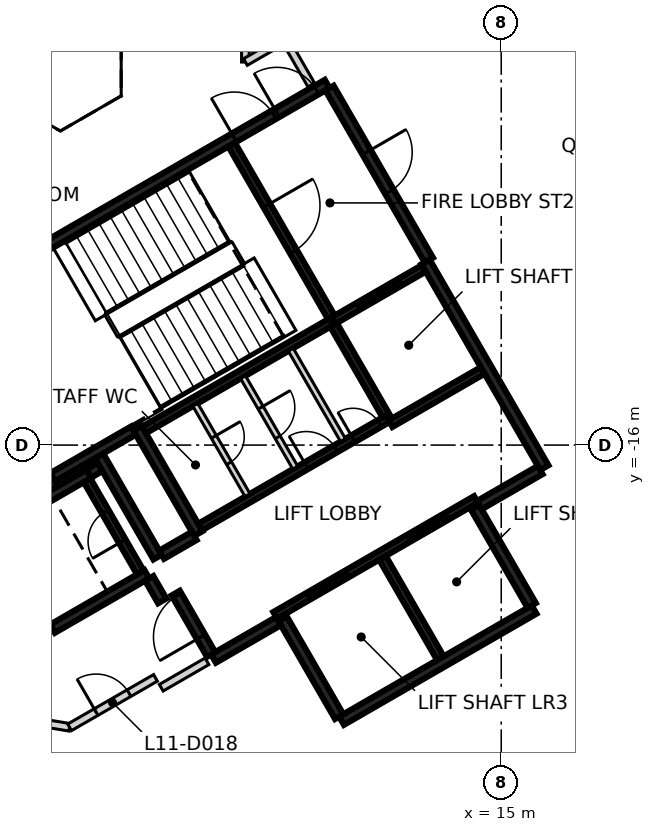
"""IFC4 building model, lengths in metres.
Left out: names, types, materials, properties, quantities, classifications, styles, units other than length and angle.
Written with IfcOpenShell. Run it as: python <this file> out.ifc"""

import sys

from ifc_helpers import new_model, si_unit, direction, frame, frame_2d, origin, place, context, subcontext, project, spatial, rectangle, extrude, element, fill, save


model = new_model("IFC4")
c1 = context("Model", 3, precision=1e-05, world=origin(), true_north=direction((0.0, 1.0)))
c2 = subcontext(c1, "Body", "Model", "MODEL_VIEW")
j1 = project(units=[si_unit("LENGTHUNIT", "METRE"), si_unit("PLANEANGLEUNIT", "RADIAN")], contexts=[c1])
p1 = place(None, origin())
s1 = spatial("IfcSite", under=j1, at=p1, CompositionType="ELEMENT")
p2 = place(p1, origin())
s2 = spatial("IfcBuilding", under=s1, at=p2, CompositionType="ELEMENT")
p3 = place(p2, frame((0.0, 0.0, 53.0)))
s3 = spatial("IfcBuildingStorey", under=s2, at=p3, CompositionType="ELEMENT", Elevation=53.0)
p4 = place(p3, frame((0.417, -12.273, 0.0), z_axis=(0.0, 0.0, 1.0), x_axis=(0.866021906294, 0.500006057782, 0.0)))
e1 = element("IfcWall", 1, at=p4, inside=s3, PredefinedType="SHEAR", context=c2, shape_type="SweptSolid", body=[
    extrude(rectangle(XDim=11.55, YDim=0.25, at=frame_2d((5.775, 0.0))), origin(), (0.0, 0.0, 1.0), 3.125),
])
p5 = place(p4, frame((10.025, 0.0, 0.0)))
e2 = element("IfcOpeningElement", 2, at=p5, cuts=e1, PredefinedType="OPENING", context=c2, shape_type="SweptSolid", body=[
    extrude(rectangle(XDim=1.2, YDim=2.1, at=frame_2d((0.6, 1.05))), frame((0.0, 0.135, 0.0), z_axis=(0.0, -1.0, 0.0), x_axis=(1.0, 0.0, 0.0)), (0.0, 0.0, 1.0), 0.27),
])
p6 = place(p4, frame((8.725, 0.0, 0.0)))
e3 = element("IfcOpeningElement", 3, at=p6, cuts=e1, PredefinedType="OPENING", context=c2, shape_type="SweptSolid", body=[
    extrude(rectangle(XDim=1.2, YDim=2.1, at=frame_2d((0.6, 1.05))), frame((0.0, 0.135, 0.0), z_axis=(0.0, -1.0, 0.0), x_axis=(1.0, 0.0, 0.0)), (0.0, 0.0, 1.0), 0.27),
])
p7 = place(p3, frame((13.008, -11.181, 0.0), z_axis=(0.0, 0.0, 1.0), x_axis=(0.500004234368, -0.866022959057, 0.0)))
e4 = element("IfcWall", 4, at=p7, inside=s3, PredefinedType="SHEAR", context=c2, shape_type="SweptSolid", body=[
    extrude(rectangle(XDim=6.25, YDim=0.25, at=frame_2d((3.125, 0.0))), origin(), (0.0, 0.0, 1.0), 3.125),
])
p8 = place(p3, frame((15.865, -20.328, 0.0), z_axis=(0.0, 0.0, 1.0), x_axis=(-0.86602852612, -0.499994591916, 0.0)))
e5 = element("IfcWall", 5, at=p8, inside=s3, PredefinedType="SHEAR", context=c2, shape_type="SweptSolid", body=[
    extrude(rectangle(XDim=5.85, YDim=0.25, at=frame_2d((2.925, 0.0))), origin(), (0.0, 0.0, 1.0), 3.125),
])
p9 = place(p3, frame((3.235, -17.153, 0.0), z_axis=(0.0, 0.0, 1.0), x_axis=(-0.500008851346, 0.866020293397, 0.0)))
e6 = element("IfcWall", 6, at=p9, inside=s3, PredefinedType="SHEAR", context=c2, shape_type="SweptSolid", body=[
    extrude(rectangle(XDim=5.51, YDim=0.25, at=frame_2d((2.755, 0.0))), origin(), (0.0, 0.0, 1.0), 3.125),
])
p10 = place(p3, frame((10.483, -6.606, 0.0), z_axis=(0.0, 0.0, 1.0), x_axis=(0.49999885962, -0.866026062182, 0.0)))
e7 = element("IfcWall", 7, at=p10, inside=s3, PredefinedType="SHEAR", context=c2, shape_type="SweptSolid", body=[
    extrude(rectangle(XDim=5.225, YDim=0.25, at=frame_2d((2.612, 0.0))), origin(), (0.0, 0.0, 1.0), 3.125),
])
p11 = place(p10, frame((1.95, 0.0, 0.0)))
e8 = element("IfcOpeningElement", 8, at=p11, cuts=e7, PredefinedType="OPENING", context=c2, shape_type="SweptSolid", body=[
    extrude(rectangle(XDim=1.2, YDim=2.1, at=frame_2d((0.6, 1.05))), frame((0.0, 0.135, 0.0), z_axis=(0.0, -1.0, 0.0), x_axis=(1.0, 0.0, 0.0)), (0.0, 0.0, 1.0), 0.27),
])
p12 = place(p3, frame((7.031, -18.327, 0.0), z_axis=(0.0, 0.0, 1.0), x_axis=(-0.499971222258, 0.866042017984, 0.0)))
e9 = element("IfcWall", 9, at=p12, inside=s3, PredefinedType="SHEAR", context=c2, shape_type="SweptSolid", body=[
    extrude(rectangle(XDim=3.2, YDim=0.25, at=frame_2d((1.6, 0.0))), origin(), (0.0, 0.0, 1.0), 3.125),
])
for number, where, z_axis, x_axis in (
    (10, (14.315, -17.644, 0.0), (0.0, 0.0, 1.0), (0.5, -0.866, 0.0)),
    (11, (10.736, -23.145, 0.0), (0.0, 0.0, 1.0), (-0.5, 0.866, 0.0)),
):
    element("IfcWall", number, at=place(p3, frame(where, z_axis=z_axis, x_axis=x_axis)), inside=s3, PredefinedType="SHEAR", context=c2, shape_type="SweptSolid", body=[
        extrude(rectangle(XDim=2.974, YDim=0.25, at=frame_2d((1.487, 0.0))), origin(), (0.0, 0.0, 1.0), 3.125),
    ])
p13 = place(p3, frame((3.085, -20.894, 0.0), z_axis=(0.0, 0.0, 1.0), x_axis=(-0.499978833458, 0.866037623948, 0.0)))
e12 = element("IfcWall", 12, at=p13, inside=s3, PredefinedType="SHEAR", context=c2, shape_type="SweptSolid", body=[
    extrude(rectangle(XDim=3.05, YDim=0.25, at=frame_2d((1.525, 0.0))), origin(), (0.0, 0.0, 1.0), 3.125),
])
p14 = place(p3, frame((1.669, -18.19, 0.0), z_axis=(0.0, 0.0, 1.0), x_axis=(0.866042235819, 0.499970844928, 0.0)))
e13 = element("IfcWall", 13, at=p14, inside=s3, PredefinedType="SHEAR", context=c2, shape_type="SweptSolid", body=[
    extrude(rectangle(XDim=2.865, YDim=0.25, at=frame_2d((1.432, 0.0))), origin(), (0.0, 0.0, 1.0), 3.125),
])
p15 = place(p3, frame((5.675, -19.399, 0.0), z_axis=(0.0, 0.0, 1.0), x_axis=(-0.866026637627, -0.499997862916, 0.0)))
e14 = element("IfcWall", 14, at=p15, inside=s3, PredefinedType="SHEAR", context=c2, shape_type="SweptSolid", body=[
    extrude(rectangle(XDim=2.865, YDim=0.25, at=frame_2d((1.432, 0.0))), origin(), (0.0, 0.0, 1.0), 3.125),
])
p16 = place(p3, frame((4.414, -16.276, 0.0), z_axis=(0.0, 0.0, 1.0), x_axis=(0.500003324108, -0.866023484601, 0.0)))
e15 = element("IfcWall", 15, at=p16, inside=s3, PredefinedType="SHEAR", context=c2, shape_type="SweptSolid", body=[
    extrude(rectangle(XDim=3.085, YDim=0.25, at=frame_2d((1.542, 0.0))), origin(), (0.0, 0.0, 1.0), 3.125),
])
p17 = place(p3, frame((5.322, -15.619, 0.0), z_axis=(0.0, 0.0, 1.0), x_axis=(-0.866026229868, -0.499998569178, 0.0)))
e16 = element("IfcWall", 16, at=p17, inside=s3, PredefinedType="SHEAR", context=c2, shape_type="SweptSolid", body=[
    extrude(rectangle(XDim=2.449, YDim=0.25, at=frame_2d((1.225, 0.0))), origin(), (0.0, 0.0, 1.0), 3.125),
])
p18 = place(p3, frame((9.14, -20.631, 0.0), z_axis=(0.0, 0.0, 1.0), x_axis=(-0.866043531843, -0.499968599967, 0.0)))
e17 = element("IfcWall", 17, at=p18, inside=s3, PredefinedType="SHEAR", context=c2, shape_type="SweptSolid", body=[
    extrude(rectangle(XDim=1.975, YDim=0.25, at=frame_2d((0.987, 0.0))), origin(), (0.0, 0.0, 1.0), 3.125),
])
p19 = place(p3, frame((16.025, -16.656, 0.0), z_axis=(0.0, 0.0, 1.0), x_axis=(-0.866016279763, -0.500015802937, 0.0)))
e18 = element("IfcWall", 18, at=p19, inside=s3, PredefinedType="SHEAR", context=c2, shape_type="SweptSolid", body=[
    extrude(rectangle(XDim=1.849, YDim=0.25, at=frame_2d((0.925, 0.0))), origin(), (0.0, 0.0, 1.0), 3.125),
])
p20 = place(p3, frame((7.367, -21.51, 0.0), z_axis=(0.0, 0.0, 1.0), x_axis=(-0.499983108224, 0.866035156036, 0.0)))
e19 = element("IfcWall", 19, at=p20, inside=s3, PredefinedType="SHEAR", context=c2, shape_type="SweptSolid", body=[
    extrude(rectangle(XDim=1.865, YDim=0.25, at=frame_2d((0.932, 0.0))), origin(), (0.0, 0.0, 1.0), 3.125),
])
p21 = place(p20, frame((0.535, 0.0, 0.0)))
e20 = element("IfcOpeningElement", 20, at=p21, cuts=e19, PredefinedType="OPENING", context=c2, shape_type="SweptSolid", body=[
    extrude(rectangle(XDim=1.25, YDim=2.1, at=frame_2d((0.625, 1.05))), frame((0.0, 0.135, 0.0), z_axis=(0.0, -1.0, 0.0), x_axis=(1.0, 0.0, 0.0)), (0.0, 0.0, 1.0), 0.27),
])
p22 = place(p3, frame((6.065, -18.885, 0.0), z_axis=(0.0, 0.0, 1.0), x_axis=(0.866017078145, 0.500014420154, 0.0)))
e21 = element("IfcWall", 21, at=p22, inside=s3, PredefinedType="SHEAR", context=c2, shape_type="SweptSolid", body=[
    extrude(rectangle(XDim=0.989, YDim=0.25, at=frame_2d((0.495, 0.0))), origin(), (0.0, 0.0, 1.0), 3.125),
])
p23 = place(p3, frame((6.08, -20.1, 0.0), z_axis=(0.0, 0.0, 1.0), x_axis=(-0.500051773299, 0.865995510393, 0.0)))
e22 = element("IfcWall", 22, at=p23, inside=s3, PredefinedType="SHEAR", context=c2, shape_type="SweptSolid", body=[
    extrude(rectangle(XDim=0.685, YDim=0.25, at=frame_2d((0.342, 0.0))), origin(), (0.0, 0.0, 1.0), 3.125),
])
p24 = place(p3, frame((4.145, -16.749, 0.0), z_axis=(0.0, 0.0, 1.0), x_axis=(0.866185586049, 0.49972245349, 0.0)))
e23 = element("IfcWall", 23, at=p24, inside=s3, PredefinedType="SHEAR", context=c2, shape_type="SweptSolid", body=[
    extrude(rectangle(XDim=0.344, YDim=0.25, at=frame_2d((0.172, 0.0))), origin(), (0.0, 0.0, 1.0), 3.125),
])
p25 = place(p3, frame((9.052, -20.48, 0.0), z_axis=(0.0, 0.0, 1.0), x_axis=(0.866030299012, 0.499991521122, 0.0)))
e24 = element("IfcWall", 24, at=p25, inside=s3, PredefinedType="SHEAR", context=c2, shape_type="SweptSolid", body=[
    extrude(rectangle(XDim=6.1, YDim=0.2, at=frame_2d((3.05, 0.0))), origin(), (0.0, 0.0, 1.0), 3.125),
])
p26 = place(p25, frame((1.0, 0.0, 0.0)))
e25 = element("IfcOpeningElement", 25, at=p26, cuts=e24, PredefinedType="OPENING", context=c2, shape_type="SweptSolid", body=[
    extrude(rectangle(XDim=1.2, YDim=2.1, at=frame_2d((0.6, 1.05))), frame((0.0, 0.11, 0.0), z_axis=(0.0, -1.0, 0.0), x_axis=(1.0, 0.0, 0.0)), (0.0, 0.0, 1.0), 0.22),
])
p27 = place(p25, frame((4.05, 0.0, 0.0)))
e26 = element("IfcOpeningElement", 26, at=p27, cuts=e24, PredefinedType="OPENING", context=c2, shape_type="SweptSolid", body=[
    extrude(rectangle(XDim=1.2, YDim=2.1, at=frame_2d((0.6, 1.05))), frame((0.0, 0.11, 0.0), z_axis=(0.0, -1.0, 0.0), x_axis=(1.0, 0.0, 0.0)), (0.0, 0.0, 1.0), 0.22),
])
p28 = place(p3, frame((10.538, -12.752, 0.0), z_axis=(0.0, 0.0, 1.0), x_axis=(-0.866038630372, -0.499977090179, 0.0)))
e27 = element("IfcWall", 27, at=p28, inside=s3, PredefinedType="SHEAR", context=c2, shape_type="SweptSolid", body=[
    extrude(rectangle(XDim=5.699, YDim=0.2, at=frame_2d((2.85, 0.0))), origin(), (0.0, 0.0, 1.0), 3.125),
])
p29 = place(p3, frame((7.077, -18.156, 0.0), z_axis=(0.0, 0.0, 1.0), x_axis=(0.866038630372, 0.499977090179, 0.0)))
e28 = element("IfcWall", 28, at=p29, inside=s3, PredefinedType="SHEAR", context=c2, shape_type="SweptSolid", body=[
    extrude(rectangle(XDim=5.699, YDim=0.2, at=frame_2d((2.85, 0.0))), origin(), (0.0, 0.0, 1.0), 3.125),
])
p30 = place(p29, frame((3.224, 0.0, 0.0)))
e29 = element("IfcOpeningElement", 29, at=p30, cuts=e28, PredefinedType="OPENING", context=c2, shape_type="SweptSolid", body=[
    extrude(rectangle(XDim=0.9, YDim=2.1, at=frame_2d((0.45, 1.05))), frame((0.0, 0.11, 0.0), z_axis=(0.0, -1.0, 0.0), x_axis=(1.0, 0.0, 0.0)), (0.0, 0.0, 1.0), 0.22),
])
p31 = place(p29, frame((4.649, 0.0, 0.0)))
e30 = element("IfcOpeningElement", 30, at=p31, cuts=e28, PredefinedType="OPENING", context=c2, shape_type="SweptSolid", body=[
    extrude(rectangle(XDim=0.8, YDim=2.1, at=frame_2d((0.4, 1.05))), frame((0.0, 0.11, 0.0), z_axis=(0.0, -1.0, 0.0), x_axis=(1.0, 0.0, 0.0)), (0.0, 0.0, 1.0), 0.22),
])
p32 = place(p3, frame((7.906, -8.094, 0.0), z_axis=(0.0, 0.0, 1.0), x_axis=(0.500024287448, -0.866011380966, 0.0)))
e31 = element("IfcWall", 31, at=p32, inside=s3, PredefinedType="SHEAR", context=c2, shape_type="SweptSolid", body=[
    extrude(rectangle(XDim=5.251, YDim=0.2, at=frame_2d((2.625, 0.0))), origin(), (0.0, 0.0, 1.0), 3.125),
])
p33 = place(p32, frame((1.849, 0.0, 0.0)))
e32 = element("IfcOpeningElement", 32, at=p33, cuts=e31, PredefinedType="OPENING", context=c2, shape_type="SweptSolid", body=[
    extrude(rectangle(XDim=1.4, YDim=2.1, at=frame_2d((0.7, 1.05))), frame((0.0, 0.11, 0.0), z_axis=(0.0, -1.0, 0.0), x_axis=(1.0, 0.0, 0.0)), (0.0, 0.0, 1.0), 0.22),
])
p34 = place(p3, frame((11.875, -18.967, 0.0), z_axis=(0.0, 0.0, 1.0), x_axis=(0.49998131003, -0.866036194175, 0.0)))
e33 = element("IfcWall", 33, at=p34, inside=s3, PredefinedType="SHEAR", context=c2, shape_type="SweptSolid", body=[
    extrude(rectangle(XDim=3.048, YDim=0.2, at=frame_2d((1.524, 0.0))), origin(), (0.0, 0.0, 1.0), 3.125),
])
p35 = place(p3, frame((5.503, -19.352, 0.0), z_axis=(0.0, 0.0, 1.0), x_axis=(-0.499986818241, 0.866033014143, 0.0)))
e34 = element("IfcWall", 34, at=p35, inside=s3, PredefinedType="SHEAR", context=c2, shape_type="SweptSolid", body=[
    extrude(rectangle(XDim=2.798, YDim=0.2, at=frame_2d((1.399, 0.0))), origin(), (0.0, 0.0, 1.0), 3.125),
])
p36 = place(p35, frame((0.949, 0.0, 0.0)))
e35 = element("IfcOpeningElement", 35, at=p36, cuts=e34, PredefinedType="OPENING", context=c2, shape_type="SweptSolid", body=[
    extrude(rectangle(XDim=0.9, YDim=2.1, at=frame_2d((0.45, 1.05))), frame((0.0, 0.11, 0.0), z_axis=(0.0, -1.0, 0.0), x_axis=(1.0, 0.0, 0.0)), (0.0, 0.0, 1.0), 0.22),
])
p37 = place(p3, frame((11.963, -15.22, 0.0), z_axis=(0.0, 0.0, 1.0), x_axis=(-0.500034990121, 0.866005201286, 0.0)))
e36 = element("IfcWall", 36, at=p37, inside=s3, PredefinedType="SHEAR", context=c2, shape_type="SweptSolid", body=[
    extrude(rectangle(XDim=2.75, YDim=0.2, at=frame_2d((1.375, 0.0))), origin(), (0.0, 0.0, 1.0), 3.125),
])
p38 = place(p3, frame((10.587, -12.723, 0.0), z_axis=(0.0, 0.0, 1.0), x_axis=(0.866037306777, 0.499979382845, 0.0)))
e37 = element("IfcWall", 37, at=p38, inside=s3, PredefinedType="SHEAR", context=c2, shape_type="SweptSolid", body=[
    extrude(rectangle(XDim=2.742, YDim=0.2, at=frame_2d((1.371, 0.0))), origin(), (0.0, 0.0, 1.0), 3.125),
])
p39 = place(p38, frame((0.743, 0.0, 0.0)))
e38 = element("IfcOpeningElement", 38, at=p39, cuts=e37, PredefinedType="OPENING", context=c2, shape_type="SweptSolid", body=[
    extrude(rectangle(XDim=1.3, YDim=2.1, at=frame_2d((0.65, 1.05))), frame((0.0, 0.11, 0.0), z_axis=(0.0, -1.0, 0.0), x_axis=(1.0, 0.0, 0.0)), (0.0, 0.0, 1.0), 0.22),
])
p40 = place(p3, frame((14.512, -14.037, 0.0), z_axis=(0.0, 0.0, 1.0), x_axis=(-0.866044696403, -0.499966582715, 0.0)))
e39 = element("IfcWall", 39, at=p40, inside=s3, PredefinedType="SHEAR", context=c2, shape_type="SweptSolid", body=[
    extrude(rectangle(XDim=2.799, YDim=0.2, at=frame_2d((1.399, 0.0))), origin(), (0.0, 0.0, 1.0), 3.125),
])
p41 = place(p3, frame((8.207, -14.214, 0.0), z_axis=(0.0, 0.0, 1.0), x_axis=(0.50002746344, -0.86600954718, 0.0)))
e40 = element("IfcWall", 40, at=p41, inside=s3, PredefinedType="PARTITIONING", context=c2, shape_type="SweptSolid", body=[
    extrude(rectangle(XDim=2.748, YDim=0.15, at=frame_2d((1.374, 0.0))), origin(), (0.0, 0.0, 1.0), 3.125),
])
p42 = place(p41, frame((0.924, 0.0, 0.0)))
e41 = element("IfcOpeningElement", 41, at=p42, cuts=e40, PredefinedType="OPENING", context=c2, shape_type="SweptSolid", body=[
    extrude(rectangle(XDim=0.9, YDim=2.1, at=frame_2d((0.45, 1.05))), frame((0.0, 0.085, 0.0), z_axis=(0.0, -1.0, 0.0), x_axis=(1.0, 0.0, 0.0)), (0.0, 0.0, 1.0), 0.17),
])
p43 = place(p3, frame((9.462, -13.489, 0.0), z_axis=(0.0, 0.0, 1.0), x_axis=(0.499988999718, -0.866031754707, 0.0)))
e42 = element("IfcWall", 42, at=p43, inside=s3, PredefinedType="PARTITIONING", context=c2, shape_type="SweptSolid", body=[
    extrude(rectangle(XDim=2.749, YDim=0.15, at=frame_2d((1.374, 0.0))), origin(), (0.0, 0.0, 1.0), 3.125),
])
p44 = place(p3, frame((6.951, -14.939, 0.0), z_axis=(0.0, 0.0, 1.0), x_axis=(0.499988999718, -0.866031754707, 0.0)))
e43 = element("IfcWall", 43, at=p44, inside=s3, PredefinedType="PARTITIONING", context=c2, shape_type="SweptSolid", body=[
    extrude(rectangle(XDim=2.749, YDim=0.15, at=frame_2d((1.374, 0.0))), origin(), (0.0, 0.0, 1.0), 3.125),
])
p45 = place(p44, frame((0.974, 0.0, 0.0)))
e44 = element("IfcOpeningElement", 44, at=p45, cuts=e43, PredefinedType="OPENING", context=c2, shape_type="SweptSolid", body=[
    extrude(rectangle(XDim=0.8, YDim=2.1, at=frame_2d((0.4, 1.05))), frame((0.0, 0.085, 0.0), z_axis=(0.0, -1.0, 0.0), x_axis=(1.0, 0.0, 0.0)), (0.0, 0.0, 1.0), 0.17),
])
p46 = place(p3, frame((1.584, -23.086, 0.0), z_axis=(0.0, 0.0, 1.0), x_axis=(0.986633159246, -0.162957077405, 0.0)))
e45 = element("IfcWall", 45, at=p46, inside=s3, PredefinedType="PARTITIONING", context=c2, shape_type="SweptSolid", body=[
    extrude(rectangle(XDim=2.087, YDim=0.2, at=frame_2d((1.043, 0.0))), origin(), (0.0, 0.0, 1.0), 3.125),
])
p47 = place(p3, frame((3.643, -23.426, 0.0), z_axis=(0.0, 0.0, 1.0), x_axis=(0.866654350985, 0.498909045738, 0.0)))
e46 = element("IfcWall", 46, at=p47, inside=s3, PredefinedType="PARTITIONING", context=c2, shape_type="SweptSolid", body=[
    extrude(rectangle(XDim=2.608, YDim=0.2, at=frame_2d((1.304, 0.0))), origin(), (0.0, 0.0, 1.0), 3.125),
])
p48 = place(p47, frame((0.804, 0.0, 0.0)))
e47 = element("IfcOpeningElement", 47, at=p48, cuts=e46, PredefinedType="OPENING", context=c2, shape_type="SweptSolid", body=[
    extrude(rectangle(XDim=1.0, YDim=2.1, at=frame_2d((0.5, 1.05))), frame((0.0, 0.11, 0.0), z_axis=(0.0, -1.0, 0.0), x_axis=(1.0, 0.0, 0.0)), (0.0, 0.0, 1.0), 0.22),
])
p49 = place(p3, frame((6.054, -22.385, 0.0), z_axis=(0.0, 0.0, 1.0), x_axis=(0.86593101922, 0.500163443238, 0.0)))
e48 = element("IfcWall", 48, at=p49, inside=s3, PredefinedType="PARTITIONING", context=c2, shape_type="SweptSolid", body=[
    extrude(rectangle(XDim=1.39, YDim=0.2, at=frame_2d((0.695, 0.0))), origin(), (0.0, 0.0, 1.0), 3.125),
])
p50 = place(p3, frame((8.268, -5.921, 0.0), z_axis=(0.0, 0.0, 1.0), x_axis=(0.0, 1.0, 0.0)))
e49 = element("IfcWall", 49, at=p50, inside=s3, PredefinedType="PARTITIONING", context=c2, shape_type="SweptSolid", body=[
    extrude(rectangle(XDim=1.2, YDim=0.2, at=frame_2d((0.6, 0.0))), origin(), (0.0, 0.0, 1.0), 3.125),
])
p51 = place(p3, frame((8.268, -5.921, 0.0), z_axis=(0.0, 0.0, 1.0), x_axis=(0.866344856625, 0.499446282797, 0.0)))
e50 = element("IfcWall", 50, at=p51, inside=s3, PredefinedType="PARTITIONING", context=c2, shape_type="SweptSolid", body=[
    extrude(rectangle(XDim=1.199, YDim=0.2, at=frame_2d((0.6, 0.0))), origin(), (0.0, 0.0, 1.0), 3.125),
])
p52 = place(p3, frame((9.307, -5.322, 0.0), z_axis=(0.0, 0.0, 1.0), x_axis=(0.500295157811, -0.865854927266, 0.0)))
e51 = element("IfcWall", 51, at=p52, inside=s3, PredefinedType="PARTITIONING", context=c2, shape_type="SweptSolid", body=[
    extrude(rectangle(XDim=1.39, YDim=0.2, at=frame_2d((0.695, 0.0))), origin(), (0.0, 0.0, 1.0), 3.125),
])
p53 = place(p39, origin())
e52 = element("IfcDoor", 52, at=p53, inside=s3, OperationType="SLIDING_TO_RIGHT", PredefinedType="DOOR", context=c2, shape_type="SweptSolid", body=[
    extrude(rectangle(XDim=1.3, YDim=2.1, at=frame_2d((0.65, 1.05))), frame((0.0, 0.025, 0.0), z_axis=(0.0, -1.0, 0.0), x_axis=(1.0, 0.0, 0.0)), (0.0, 0.0, 1.0), 0.05),
])
fill(e38, e52)
p54 = place(p26, origin())
e53 = element("IfcDoor", 53, at=p54, inside=s3, OperationType="DOUBLE_DOOR_SLIDING", PredefinedType="DOOR", context=c2, shape_type="SweptSolid", body=[
    extrude(rectangle(XDim=1.2, YDim=2.1, at=frame_2d((0.6, 1.05))), frame((0.0, 0.025, 0.0), z_axis=(0.0, -1.0, 0.0), x_axis=(1.0, 0.0, 0.0)), (0.0, 0.0, 1.0), 0.05),
])
fill(e25, e53)
p55 = place(p27, origin())
e54 = element("IfcDoor", 54, at=p55, inside=s3, OperationType="DOUBLE_DOOR_SLIDING", PredefinedType="DOOR", context=c2, shape_type="SweptSolid", body=[
    extrude(rectangle(XDim=1.2, YDim=2.1, at=frame_2d((0.6, 1.05))), frame((0.0, 0.025, 0.0), z_axis=(0.0, -1.0, 0.0), x_axis=(1.0, 0.0, 0.0)), (0.0, 0.0, 1.0), 0.05),
])
fill(e26, e54)
p56 = place(p21, origin())
e55 = element("IfcDoor", 55, at=p56, inside=s3, OperationType="SINGLE_SWING_LEFT", PredefinedType="DOOR", context=c2, shape_type="SweptSolid", body=[
    extrude(rectangle(XDim=1.25, YDim=2.1, at=frame_2d((0.625, 1.05))), frame((0.0, 0.025, 0.0), z_axis=(0.0, -1.0, 0.0), x_axis=(1.0, 0.0, 0.0)), (0.0, 0.0, 1.0), 0.05),
])
fill(e20, e55)
p57 = place(p5, origin())
e56 = element("IfcDoor", 56, at=p57, inside=s3, OperationType="SINGLE_SWING_LEFT", PredefinedType="DOOR", context=c2, shape_type="SweptSolid", body=[
    extrude(rectangle(XDim=1.2, YDim=2.1, at=frame_2d((0.6, 1.05))), frame((0.0, 0.025, 0.0), z_axis=(0.0, -1.0, 0.0), x_axis=(1.0, 0.0, 0.0)), (0.0, 0.0, 1.0), 0.05),
])
fill(e2, e56)
p58 = place(p6, origin())
e57 = element("IfcDoor", 57, at=p58, inside=s3, OperationType="SINGLE_SWING_RIGHT", PredefinedType="DOOR", context=c2, shape_type="SweptSolid", body=[
    extrude(rectangle(XDim=1.2, YDim=2.1, at=frame_2d((0.6, 1.05))), frame((0.0, 0.025, 0.0), z_axis=(0.0, -1.0, 0.0), x_axis=(1.0, 0.0, 0.0)), (0.0, 0.0, 1.0), 0.05),
])
fill(e3, e57)
p59 = place(p33, origin())
e58 = element("IfcDoor", 58, at=p59, inside=s3, OperationType="SINGLE_SWING_RIGHT", PredefinedType="DOOR", context=c2, shape_type="SweptSolid", body=[
    extrude(rectangle(XDim=1.4, YDim=2.1, at=frame_2d((0.7, 1.05))), frame((0.0, 0.025, 0.0), z_axis=(0.0, -1.0, 0.0), x_axis=(1.0, 0.0, 0.0)), (0.0, 0.0, 1.0), 0.05),
])
fill(e32, e58)
p60 = place(p30, origin())
e59 = element("IfcDoor", 59, at=p60, inside=s3, OperationType="SINGLE_SWING_LEFT", PredefinedType="DOOR", context=c2, shape_type="SweptSolid", body=[
    extrude(rectangle(XDim=0.9, YDim=2.1, at=frame_2d((0.45, 1.05))), frame((0.0, 0.025, 0.0), z_axis=(0.0, -1.0, 0.0), x_axis=(1.0, 0.0, 0.0)), (0.0, 0.0, 1.0), 0.05),
])
fill(e29, e59)
p61 = place(p31, origin())
e60 = element("IfcDoor", 60, at=p61, inside=s3, OperationType="SINGLE_SWING_RIGHT", PredefinedType="DOOR", context=c2, shape_type="SweptSolid", body=[
    extrude(rectangle(XDim=0.8, YDim=2.1, at=frame_2d((0.4, 1.05))), frame((0.0, 0.025, 0.0), z_axis=(0.0, -1.0, 0.0), x_axis=(1.0, 0.0, 0.0)), (0.0, 0.0, 1.0), 0.05),
])
fill(e30, e60)
p62 = place(p36, origin())
e61 = element("IfcDoor", 61, at=p62, inside=s3, OperationType="SINGLE_SWING_LEFT", PredefinedType="DOOR", context=c2, shape_type="SweptSolid", body=[
    extrude(rectangle(XDim=0.9, YDim=2.1, at=frame_2d((0.45, 1.05))), frame((0.0, 0.025, 0.0), z_axis=(0.0, -1.0, 0.0), x_axis=(1.0, 0.0, 0.0)), (0.0, 0.0, 1.0), 0.05),
])
fill(e35, e61)
p63 = place(p42, origin())
e62 = element("IfcDoor", 62, at=p63, inside=s3, OperationType="SINGLE_SWING_RIGHT", PredefinedType="DOOR", context=c2, shape_type="SweptSolid", body=[
    extrude(rectangle(XDim=0.9, YDim=2.1, at=frame_2d((0.45, 1.05))), frame((0.0, 0.025, 0.0), z_axis=(0.0, -1.0, 0.0), x_axis=(1.0, 0.0, 0.0)), (0.0, 0.0, 1.0), 0.05),
])
fill(e41, e62)
p64 = place(p45, origin())
e63 = element("IfcDoor", 63, at=p64, inside=s3, OperationType="SINGLE_SWING_LEFT", PredefinedType="DOOR", context=c2, shape_type="SweptSolid", body=[
    extrude(rectangle(XDim=0.8, YDim=2.1, at=frame_2d((0.4, 1.05))), frame((0.0, 0.025, 0.0), z_axis=(0.0, -1.0, 0.0), x_axis=(1.0, 0.0, 0.0)), (0.0, 0.0, 1.0), 0.05),
])
fill(e44, e63)
p65 = place(p11, origin())
e64 = element("IfcDoor", 64, at=p65, inside=s3, OperationType="SINGLE_SWING_LEFT", PredefinedType="DOOR", context=c2, shape_type="SweptSolid", body=[
    extrude(rectangle(XDim=1.2, YDim=2.1, at=frame_2d((0.6, 1.05))), frame((0.0, 0.025, 0.0), z_axis=(0.0, -1.0, 0.0), x_axis=(1.0, 0.0, 0.0)), (0.0, 0.0, 1.0), 0.05),
])
fill(e8, e64)
p66 = place(p48, frame((1.0, 0.0, 0.0), z_axis=(0.0, 0.0, 1.0), x_axis=(-1.0, 0.0, 0.0)))
e65 = element("IfcDoor", 65, at=p66, inside=s3, OperationType="SINGLE_SWING_LEFT", PredefinedType="DOOR", context=c2, shape_type="SweptSolid", body=[
    extrude(rectangle(XDim=1.0, YDim=2.1, at=frame_2d((0.5, 1.05))), frame((0.0, 0.025, 0.0), z_axis=(0.0, -1.0, 0.0), x_axis=(1.0, 0.0, 0.0)), (0.0, 0.0, 1.0), 0.05),
])
fill(e47, e65)
save(model, sys.argv[1])
